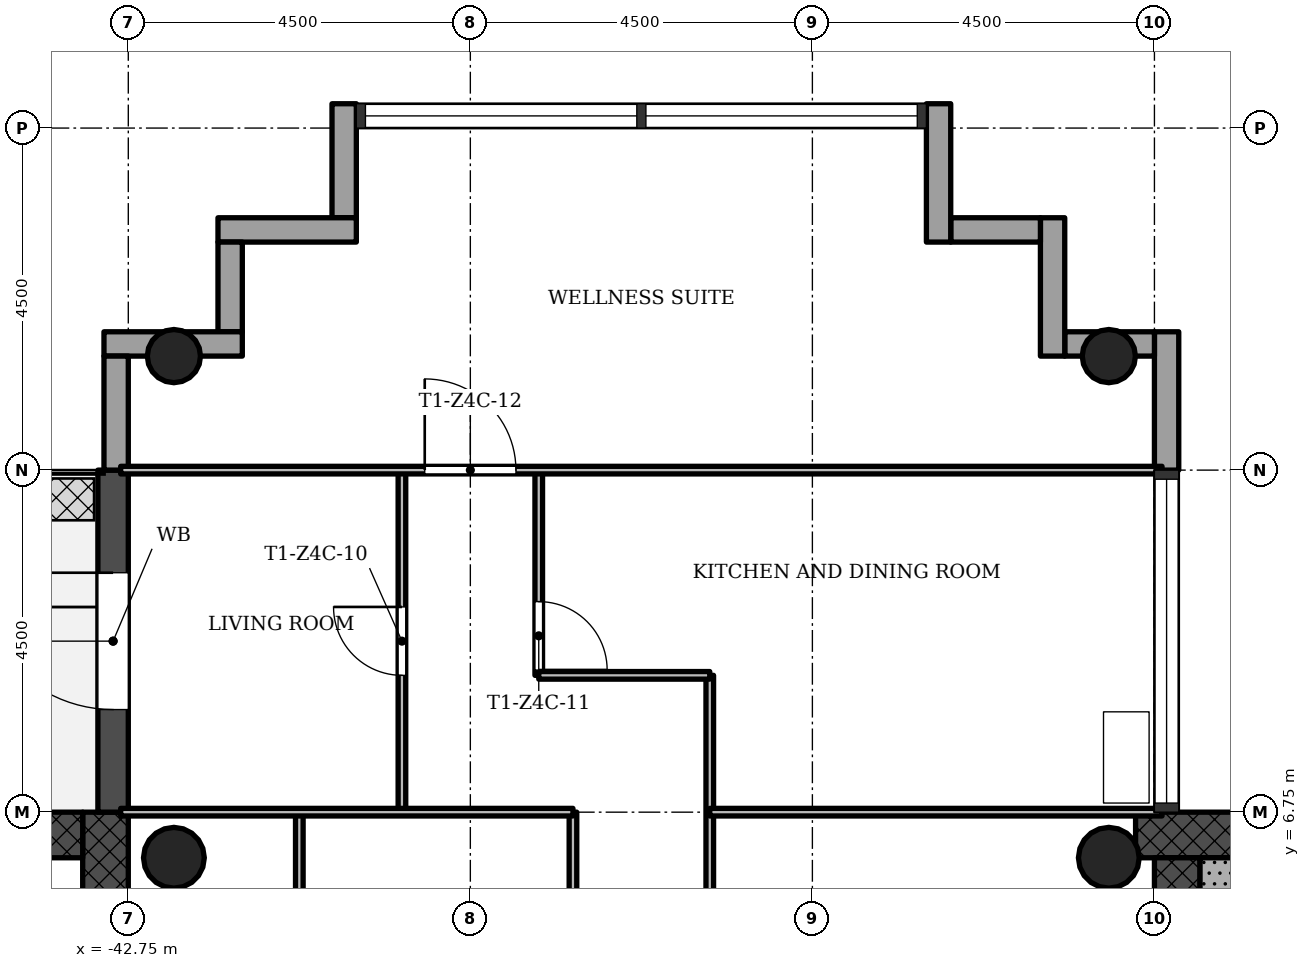
"""IFC4 building model, lengths in metres.
Left out: names, types, materials, properties, quantities, classifications, styles, units other than length and angle.
Written with IfcOpenShell. Run it as: python <this file> out.ifc"""

import sys

from ifc_helpers import new_model, si_unit, direction, frame, frame_2d, origin, origin_2d, place, context, subcontext, project, spatial, rectangle, hollow_circle, extrude, element, fill, save


model = new_model("IFC4")
c1 = context("Model", 3, precision=1e-05, world=origin(), true_north=direction((0.0, 1.0)))
c2 = subcontext(c1, "Body", "Model", "MODEL_VIEW")
j1 = project(units=[si_unit("LENGTHUNIT", "METRE"), si_unit("PLANEANGLEUNIT", "RADIAN")], contexts=[c1])
p1 = place(None, origin())
s1 = spatial("IfcSite", under=j1, at=p1, CompositionType="ELEMENT")
p2 = place(p1, origin())
s2 = spatial("IfcBuilding", under=s1, at=p2, CompositionType="ELEMENT")
p3 = place(p2, frame((0.0, 0.0, 185.8)))
s3 = spatial("IfcBuildingStorey", under=s2, at=p3, CompositionType="ELEMENT", Elevation=185.8)
p4 = place(p3, frame((-20.602, 6.45, 0.0), z_axis=(0.0, 0.0, 1.0), x_axis=(-1.0, 0.0, 0.0)))
e1 = element("IfcWall", 1, at=p4, inside=s3, PredefinedType="SHEAR", context=c2, shape_type="SweptSolid", body=[
    extrude(rectangle(XDim=8.896, YDim=0.6, at=frame_2d((4.448, 0.0))), origin(), (0.0, 0.0, 1.0), 3.4),
])
p5 = place(p3, frame((-28.95, 6.15, 0.0), z_axis=(0.0, 0.0, 1.0), x_axis=(0.0, -1.0, 0.0)))
e2 = element("IfcWall", 2, at=p5, inside=s3, PredefinedType="SHEAR", context=c2, shape_type="SweptSolid", body=[
    extrude(rectangle(XDim=12.9, YDim=0.6, at=frame_2d((6.45, 0.0))), origin(), (0.0, 0.0, 1.0), 3.4),
])
p6 = place(p5, frame((5.25, 0.0, 0.0)))
e3 = element("IfcOpeningElement", 3, at=p6, cuts=e2, PredefinedType="OPENING", context=c2, shape_type="SweptSolid", body=[
    extrude(rectangle(XDim=1.8, YDim=2.1, at=frame_2d((0.9, 1.05))), frame((0.0, 0.31, 0.0), z_axis=(0.0, -1.0, 0.0), x_axis=(1.0, 0.0, 0.0)), (0.0, 0.0, 1.0), 0.62),
])
p7 = place(p3, frame((-43.05, -6.15, 0.0), z_axis=(0.0, 0.0, 1.0), x_axis=(0.0, 1.0, 0.0)))
e4 = element("IfcWall", 4, at=p7, inside=s3, PredefinedType="SHEAR", context=c2, shape_type="SweptSolid", body=[
    extrude(rectangle(XDim=12.9, YDim=0.6, at=frame_2d((6.45, 0.0))), origin(), (0.0, 0.0, 1.0), 3.4),
])
p8 = place(p7, frame((5.25, 0.0, 0.0)))
e5 = element("IfcOpeningElement", 5, at=p8, cuts=e4, PredefinedType="OPENING", context=c2, shape_type="SweptSolid", body=[
    extrude(rectangle(XDim=1.8, YDim=2.1, at=frame_2d((0.9, 1.05))), frame((0.0, 0.31, 0.0), z_axis=(0.0, -1.0, 0.0), x_axis=(1.0, 0.0, 0.0)), (0.0, 0.0, 1.0), 0.62),
])
p9 = place(p3, frame((-43.35, 6.45, 0.0), z_axis=(0.0, 0.0, 1.0), x_axis=(-1.0, 0.0, 0.0)))
e6 = element("IfcWall", 6, at=p9, inside=s3, PredefinedType="SHEAR", context=c2, shape_type="SweptSolid", body=[
    extrude(rectangle(XDim=8.4, YDim=0.6, at=frame_2d((4.2, 0.0))), origin(), (0.0, 0.0, 1.0), 3.4),
])
for number, where, z_axis, x_axis in (
    (7, (-29.85, 12.75, 0.0), (0.0, 0.0, 1.0), (1.0, 0.0, 0.0)),
    (8, (-42.15, 12.75, 0.0), (0.0, 0.0, 1.0), (1.0, 0.0, 0.0)),
):
    element("IfcColumn", number, at=place(p3, frame(where, z_axis=z_axis, x_axis=x_axis)), inside=s3, PredefinedType="COLUMN", context=c2, shape_type="SweptSolid", body=[
        extrude(hollow_circle(Radius=0.35, WallThickness=0.025, at=origin_2d()), origin(), (0.0, 0.0, 1.0), 3.4),
    ])
for number, where, z_axis, x_axis in (
    (9, (-29.85, 6.15, 0.0), (0.0, 0.0, 1.0), (1.0, 0.0, 0.0)),
    (10, (-42.15, 6.15, 0.0), (0.0, 0.0, 1.0), (1.0, 0.0, 0.0)),
):
    element("IfcColumn", number, at=place(p3, frame(where, z_axis=z_axis, x_axis=x_axis)), inside=s3, PredefinedType="COLUMN", context=c2, shape_type="SweptSolid", body=[
        extrude(hollow_circle(Radius=0.4, WallThickness=0.028, at=origin_2d()), origin(), (0.0, 0.0, 1.0), 3.4),
    ])
p10 = place(p3, frame((-29.09, 11.25, -0.3), z_axis=(0.0, 0.0, 1.0), x_axis=(0.0, 1.0, 0.0)))
e11 = element("IfcWall", 11, at=p10, inside=s3, PredefinedType="STANDARD", context=c2, shape_type="SweptSolid", body=[
    extrude(rectangle(XDim=1.82, YDim=0.32, at=frame_2d((0.91, 0.0))), origin(), (0.0, 0.0, 1.0), 3.4),
])
p11 = place(p3, frame((-29.25, 12.91, -0.3), z_axis=(0.0, 0.0, 1.0), x_axis=(-1.0, 0.0, 0.0)))
e12 = element("IfcWall", 12, at=p11, inside=s3, PredefinedType="STANDARD", context=c2, shape_type="SweptSolid", body=[
    extrude(rectangle(XDim=1.18, YDim=0.32, at=frame_2d((0.59, 0.0))), origin(), (0.0, 0.0, 1.0), 3.4),
])
p12 = place(p3, frame((-30.59, 12.75, -0.3), z_axis=(0.0, 0.0, 1.0), x_axis=(0.0, 1.0, 0.0)))
e13 = element("IfcWall", 13, at=p12, inside=s3, PredefinedType="STANDARD", context=c2, shape_type="SweptSolid", body=[
    extrude(rectangle(XDim=1.82, YDim=0.32, at=frame_2d((0.91, 0.0))), origin(), (0.0, 0.0, 1.0), 3.4),
])
p13 = place(p3, frame((-30.75, 14.41, -0.3), z_axis=(0.0, 0.0, 1.0), x_axis=(-1.0, 0.0, 0.0)))
e14 = element("IfcWall", 14, at=p13, inside=s3, PredefinedType="STANDARD", context=c2, shape_type="SweptSolid", body=[
    extrude(rectangle(XDim=1.18, YDim=0.32, at=frame_2d((0.59, 0.0))), origin(), (0.0, 0.0, 1.0), 3.4),
])
p14 = place(p3, frame((-32.09, 14.25, -0.3), z_axis=(0.0, 0.0, 1.0), x_axis=(0.0, 1.0, 0.0)))
e15 = element("IfcWall", 15, at=p14, inside=s3, PredefinedType="STANDARD", context=c2, shape_type="SweptSolid", body=[
    extrude(rectangle(XDim=1.82, YDim=0.32, at=frame_2d((0.91, 0.0))), origin(), (0.0, 0.0, 1.0), 3.4),
])
p15 = place(p3, frame((-39.91, 16.07, -0.3), z_axis=(0.0, 0.0, 1.0), x_axis=(0.0, -1.0, 0.0)))
e16 = element("IfcWall", 16, at=p15, inside=s3, PredefinedType="STANDARD", context=c2, shape_type="SweptSolid", body=[
    extrude(rectangle(XDim=1.5, YDim=0.32, at=frame_2d((0.75, 0.0))), origin(), (0.0, 0.0, 1.0), 3.4),
])
p16 = place(p3, frame((-39.75, 14.41, -0.3), z_axis=(0.0, 0.0, 1.0), x_axis=(-1.0, 0.0, 0.0)))
e17 = element("IfcWall", 17, at=p16, inside=s3, PredefinedType="STANDARD", context=c2, shape_type="SweptSolid", body=[
    extrude(rectangle(XDim=1.82, YDim=0.32, at=frame_2d((0.91, 0.0))), origin(), (0.0, 0.0, 1.0), 3.4),
])
p17 = place(p3, frame((-41.41, 14.25, -0.3), z_axis=(0.0, 0.0, 1.0), x_axis=(0.0, -1.0, 0.0)))
e18 = element("IfcWall", 18, at=p17, inside=s3, PredefinedType="STANDARD", context=c2, shape_type="SweptSolid", body=[
    extrude(rectangle(XDim=1.18, YDim=0.32, at=frame_2d((0.59, 0.0))), origin(), (0.0, 0.0, 1.0), 3.4),
])
p18 = place(p3, frame((-41.25, 12.91, -0.3), z_axis=(0.0, 0.0, 1.0), x_axis=(-1.0, 0.0, 0.0)))
e19 = element("IfcWall", 19, at=p18, inside=s3, PredefinedType="STANDARD", context=c2, shape_type="SweptSolid", body=[
    extrude(rectangle(XDim=1.82, YDim=0.32, at=frame_2d((0.91, 0.0))), origin(), (0.0, 0.0, 1.0), 3.4),
])
p19 = place(p3, frame((-42.91, 12.75, -0.3), z_axis=(0.0, 0.0, 1.0), x_axis=(0.0, -1.0, 0.0)))
e20 = element("IfcWall", 20, at=p19, inside=s3, PredefinedType="STANDARD", context=c2, shape_type="SweptSolid", body=[
    extrude(rectangle(XDim=1.5, YDim=0.32, at=frame_2d((0.75, 0.0))), origin(), (0.0, 0.0, 1.0), 3.4),
])
p20 = place(p3, frame((-42.95, 11.25, -0.02), z_axis=(0.0, 0.0, 1.0), x_axis=(0.0, -1.0, 0.0)))
e21 = element("IfcWall", 21, at=p20, inside=s3, PredefinedType="STANDARD", context=c2, shape_type="SweptSolid", body=[
    extrude(rectangle(XDim=4.5, YDim=0.4, at=frame_2d((2.25, 0.0))), origin(), (0.0, 0.0, 1.0), 3.12),
])
p21 = place(p20, frame((1.35, 0.0, 0.02)))
e22 = element("IfcOpeningElement", 22, at=p21, cuts=e21, PredefinedType="OPENING", context=c2, shape_type="SweptSolid", body=[
    extrude(rectangle(XDim=1.8, YDim=2.1, at=frame_2d((0.9, 1.05))), frame((0.0, 0.21, 0.0), z_axis=(0.0, -1.0, 0.0), x_axis=(1.0, 0.0, 0.0)), (0.0, 0.0, 1.0), 0.42),
])
p22 = place(p3, frame((-40.5, 1.5, 0.0), z_axis=(0.0, 0.0, 1.0), x_axis=(0.0, 1.0, 0.0)))
e23 = element("IfcWall", 23, at=p22, inside=s3, PredefinedType="PARTITIONING", context=c2, shape_type="SweptSolid", body=[
    extrude(rectangle(XDim=5.25, YDim=0.1, at=frame_2d((2.625, 0.0))), origin(), (0.0, 0.0, 1.0), 3.0),
])
p23 = place(p22, frame((1.05, 0.0, 0.0)))
e24 = element("IfcOpeningElement", 24, at=p23, cuts=e23, PredefinedType="OPENING", context=c2, shape_type="SweptSolid", body=[
    extrude(rectangle(XDim=0.9, YDim=2.1, at=frame_2d((0.45, 1.05))), frame((0.0, 0.06, 0.0), z_axis=(0.0, -1.0, 0.0), x_axis=(1.0, 0.0, 0.0)), (0.0, 0.0, 1.0), 0.12),
])
p24 = place(p3, frame((-39.15, 6.75, 0.0), z_axis=(0.0, 0.0, 1.0), x_axis=(0.0, 1.0, 0.0)))
e25 = element("IfcWall", 25, at=p24, inside=s3, PredefinedType="PARTITIONING", context=c2, shape_type="SweptSolid", body=[
    extrude(rectangle(XDim=4.5, YDim=0.1, at=frame_2d((2.25, 0.0))), origin(), (0.0, 0.0, 1.0), 3.0),
])
p25 = place(p24, frame((1.8, 0.0, 0.0)))
e26 = element("IfcOpeningElement", 26, at=p25, cuts=e25, PredefinedType="OPENING", context=c2, shape_type="SweptSolid", body=[
    extrude(rectangle(XDim=0.9, YDim=2.1, at=frame_2d((0.45, 1.05))), frame((0.0, 0.06, 0.0), z_axis=(0.0, -1.0, 0.0), x_axis=(1.0, 0.0, 0.0)), (0.0, 0.0, 1.0), 0.12),
])
p26 = place(p3, frame((-37.35, 8.55, 0.0), z_axis=(0.0, 0.0, 1.0), x_axis=(0.0, 1.0, 0.0)))
e27 = element("IfcWall", 27, at=p26, inside=s3, PredefinedType="PARTITIONING", context=c2, shape_type="SweptSolid", body=[
    extrude(rectangle(XDim=2.7, YDim=0.1, at=frame_2d((1.35, 0.0))), origin(), (0.0, 0.0, 1.0), 3.0),
])
p27 = place(p26, frame((0.07, 0.0, 0.0)))
e28 = element("IfcOpeningElement", 28, at=p27, cuts=e27, PredefinedType="OPENING", context=c2, shape_type="SweptSolid", body=[
    extrude(rectangle(XDim=0.9, YDim=2.1, at=frame_2d((0.45, 1.05))), frame((0.0, 0.06, 0.0), z_axis=(0.0, -1.0, 0.0), x_axis=(1.0, 0.0, 0.0)), (0.0, 0.0, 1.0), 0.12),
])
p28 = place(p3, frame((-36.9, 4.5, 0.0), z_axis=(0.0, 0.0, 1.0), x_axis=(0.0, 1.0, 0.0)))
e29 = element("IfcWall", 29, at=p28, inside=s3, PredefinedType="PARTITIONING", context=c2, shape_type="SweptSolid", body=[
    extrude(rectangle(XDim=2.25, YDim=0.1, at=frame_2d((1.125, 0.0))), origin(), (0.0, 0.0, 1.0), 3.0),
])
p29 = place(p3, frame((-35.1, 4.5, 0.0), z_axis=(0.0, 0.0, 1.0), x_axis=(0.0, 1.0, 0.0)))
e30 = element("IfcWall", 30, at=p29, inside=s3, PredefinedType="PARTITIONING", context=c2, shape_type="SweptSolid", body=[
    extrude(rectangle(XDim=4.05, YDim=0.1, at=frame_2d((2.025, 0.0))), origin(), (0.0, 0.0, 1.0), 3.0),
])
for number, where, z_axis, x_axis in (
    (31, (-42.85, 6.75, 0.0), (0.0, 0.0, 1.0), (1.0, 0.0, 0.0)),
    (32, (-35.1, 6.75, 0.0), (0.0, 0.0, 1.0), (1.0, 0.0, 0.0)),
):
    element("IfcWall", number, at=place(p3, frame(where, z_axis=z_axis, x_axis=x_axis)), inside=s3, PredefinedType="PARTITIONING", context=c2, shape_type="SweptSolid", body=[
        extrude(rectangle(XDim=5.95, YDim=0.1, at=frame_2d((2.975, 0.0))), origin(), (0.0, 0.0, 1.0), 3.0),
    ])
p30 = place(p3, frame((-37.35, 8.55, 0.0), z_axis=(0.0, 0.0, 1.0), x_axis=(1.0, 0.0, 0.0)))
e33 = element("IfcWall", 33, at=p30, inside=s3, PredefinedType="PARTITIONING", context=c2, shape_type="SweptSolid", body=[
    extrude(rectangle(XDim=2.25, YDim=0.1, at=frame_2d((1.125, 0.0))), origin(), (0.0, 0.0, 1.0), 3.0),
])
p31 = place(p3, frame((-42.85, 11.25, 0.0), z_axis=(0.0, 0.0, 1.0), x_axis=(1.0, 0.0, 0.0)))
e34 = element("IfcWall", 34, at=p31, inside=s3, PredefinedType="PARTITIONING", context=c2, shape_type="SweptSolid", body=[
    extrude(rectangle(XDim=13.7, YDim=0.1, at=frame_2d((6.85, 0.0))), origin(), (0.0, 0.0, 1.0), 3.0),
])
p32 = place(p31, frame((4.0, 0.0, 0.0)))
e35 = element("IfcOpeningElement", 35, at=p32, cuts=e34, PredefinedType="OPENING", context=c2, shape_type="SweptSolid", body=[
    extrude(rectangle(XDim=1.2, YDim=2.1, at=frame_2d((0.6, 1.05))), frame((0.0, 0.06, 0.0), z_axis=(0.0, -1.0, 0.0), x_axis=(1.0, 0.0, 0.0)), (0.0, 0.0, 1.0), 0.12),
])
p33 = place(p3, frame((-28.35, 1.85, 0.0), z_axis=(0.0, 0.0, 1.0), x_axis=(0.0, 1.0, 0.0)))
e36 = element("IfcWall", 36, at=p33, inside=s3, PredefinedType="SHEAR", context=c2, shape_type="SweptSolid", body=[
    extrude(rectangle(XDim=4.3, YDim=0.6, at=frame_2d((2.15, 0.0))), origin(), (0.0, 0.0, 1.0), 3.4),
])
p34 = place(p21, origin())
e37 = element("IfcDoor", 37, at=p34, inside=s3, OperationType="SINGLE_SWING_LEFT", PredefinedType="DOOR", context=c2, shape_type="SweptSolid", body=[
    extrude(rectangle(XDim=1.8, YDim=2.1, at=frame_2d((0.9, 1.05))), frame((0.0, 0.025, 0.0), z_axis=(0.0, -1.0, 0.0), x_axis=(1.0, 0.0, 0.0)), (0.0, 0.0, 1.0), 0.05),
])
fill(e22, e37)
p35 = place(p25, origin())
e38 = element("IfcDoor", 38, at=p35, inside=s3, OperationType="SINGLE_SWING_LEFT", PredefinedType="DOOR", context=c2, shape_type="SweptSolid", body=[
    extrude(rectangle(XDim=0.9, YDim=2.1, at=frame_2d((0.45, 1.05))), frame((0.0, 0.025, 0.0), z_axis=(0.0, -1.0, 0.0), x_axis=(1.0, 0.0, 0.0)), (0.0, 0.0, 1.0), 0.05),
])
fill(e26, e38)
p36 = place(p27, origin())
e39 = element("IfcDoor", 39, at=p36, inside=s3, OperationType="SINGLE_SWING_LEFT", PredefinedType="DOOR", context=c2, shape_type="SweptSolid", body=[
    extrude(rectangle(XDim=0.9, YDim=2.1, at=frame_2d((0.45, 1.05))), frame((0.0, 0.025, 0.0), z_axis=(0.0, -1.0, 0.0), x_axis=(1.0, 0.0, 0.0)), (0.0, 0.0, 1.0), 0.05),
])
fill(e28, e39)
p37 = place(p32, origin())
e40 = element("IfcDoor", 40, at=p37, inside=s3, OperationType="SINGLE_SWING_RIGHT", PredefinedType="DOOR", context=c2, shape_type="SweptSolid", body=[
    extrude(rectangle(XDim=1.2, YDim=2.1, at=frame_2d((0.6, 1.05))), frame((0.0, 0.025, 0.0), z_axis=(0.0, -1.0, 0.0), x_axis=(1.0, 0.0, 0.0)), (0.0, 0.0, 1.0), 0.05),
])
fill(e35, e40)
save(model, sys.argv[1])
